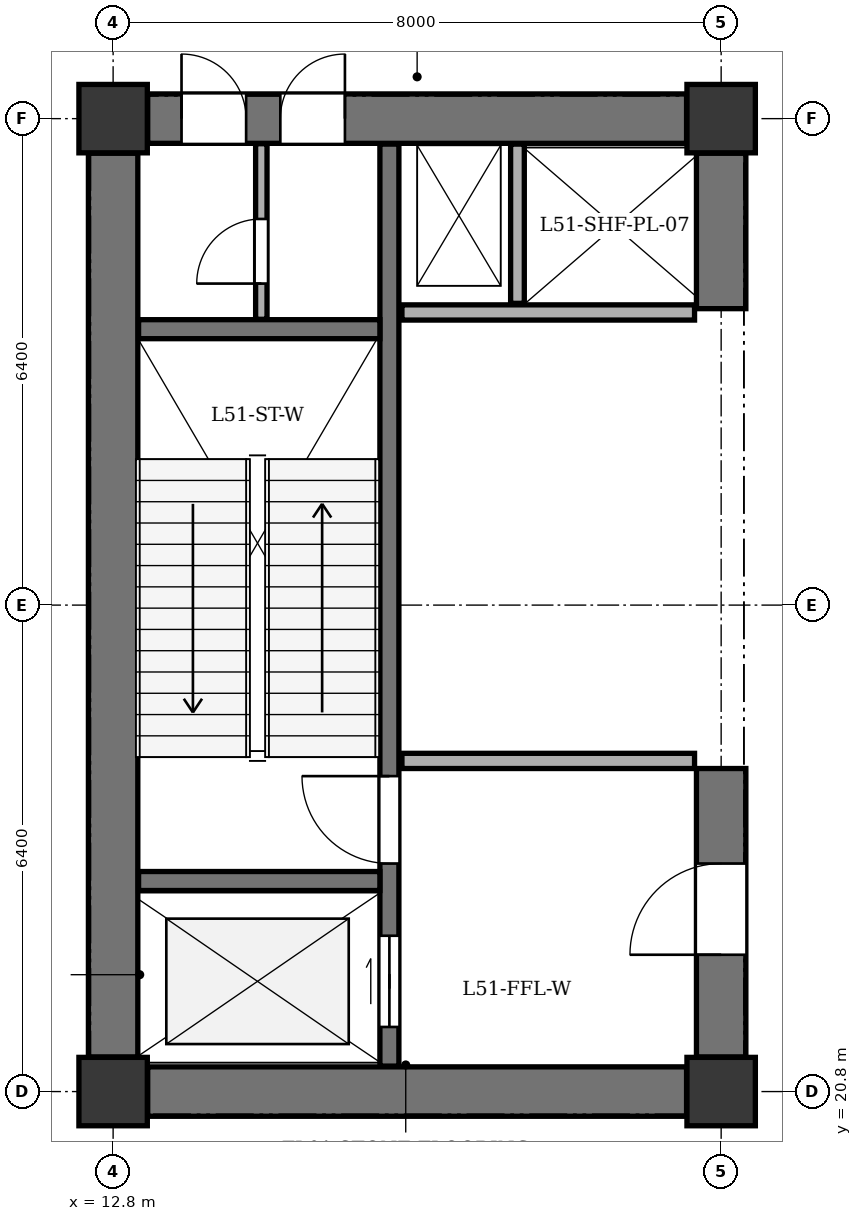
"""IFC4 building model, lengths in metres.
Left out: names, types, materials, properties, quantities, classifications, styles, units other than length and angle.
Written with IfcOpenShell. Run it as: python <this file> out.ifc"""

import sys

from ifc_helpers import new_model, si_unit, direction, frame, frame_2d, origin, origin_2d, place, context, subcontext, project, spatial, rectangle, extrude, element, fill, save


model = new_model("IFC4")
c1 = context("Model", 3, precision=1e-05, world=origin(), true_north=direction((0.0, 1.0)))
c2 = subcontext(c1, "Body", "Model", "MODEL_VIEW")
j1 = project(units=[si_unit("LENGTHUNIT", "METRE"), si_unit("PLANEANGLEUNIT", "RADIAN")], contexts=[c1])
p1 = place(None, origin())
s1 = spatial("IfcSite", under=j1, at=p1, CompositionType="ELEMENT")
p2 = place(p1, origin())
s2 = spatial("IfcBuilding", under=s1, at=p2, CompositionType="ELEMENT")
p3 = place(p2, frame((0.0, 0.0, 197.3)))
s3 = spatial("IfcBuildingStorey", under=s2, at=p3, CompositionType="ELEMENT", Elevation=197.3)
for number, where, z_axis, x_axis in (
    (1, (12.8, 20.8, 0.0), (0.0, 0.0, 1.0), (1.0, 0.0, 0.0)),
    (2, (20.8, 20.8, 0.0), (0.0, 0.0, 1.0), (1.0, 0.0, 0.0)),
    (3, (12.8, 33.6, 0.0), (0.0, 0.0, 1.0), (1.0, 0.0, 0.0)),
    (4, (20.8, 33.6, 0.0), (0.0, 0.0, 1.0), (1.0, 0.0, 0.0)),
):
    element("IfcColumn", number, at=place(p3, frame(where, z_axis=z_axis, x_axis=x_axis)), inside=s3, PredefinedType="COLUMN", context=c2, shape_type="SweptSolid", body=[
        extrude(rectangle(XDim=0.9, YDim=0.9, at=origin_2d()), origin(), (0.0, 0.0, 1.0), 5.4),
    ])
p4 = place(p3, frame((12.8, 21.255, 0.0), z_axis=(0.0, 0.0, 1.0), x_axis=(0.0, 1.0, 0.0)))
e5 = element("IfcWall", 5, at=p4, inside=s3, PredefinedType="SHEAR", context=c2, shape_type="SweptSolid", body=[
    extrude(rectangle(XDim=11.89, YDim=0.65, at=frame_2d((5.945, 0.0))), origin(), (0.0, 0.0, 1.0), 5.04),
])
p5 = place(p3, frame((13.255, 20.8, 0.0), z_axis=(0.0, 0.0, 1.0), x_axis=(1.0, 0.0, 0.0)))
e6 = element("IfcWall", 6, at=p5, inside=s3, PredefinedType="SHEAR", context=c2, shape_type="SweptSolid", body=[
    extrude(rectangle(XDim=7.09, YDim=0.65, at=frame_2d((3.545, 0.0))), origin(), (0.0, 0.0, 1.0), 5.04),
])
p6 = place(p3, frame((13.255, 33.6, 0.0), z_axis=(0.0, 0.0, 1.0), x_axis=(1.0, 0.0, 0.0)))
e7 = element("IfcWall", 7, at=p6, inside=s3, PredefinedType="SHEAR", context=c2, shape_type="SweptSolid", body=[
    extrude(rectangle(XDim=7.09, YDim=0.65, at=frame_2d((3.545, 0.0))), origin(), (0.0, 0.0, 1.0), 5.04),
])
p7 = place(p6, frame((0.445, 0.0, 0.0)))
e8 = element("IfcOpeningElement", 8, at=p7, cuts=e7, PredefinedType="OPENING", context=c2, shape_type="SweptSolid", body=[
    extrude(rectangle(XDim=0.85, YDim=2.02, at=frame_2d((0.425, 1.01))), frame((0.0, 0.335, 0.0), z_axis=(0.0, -1.0, 0.0), x_axis=(1.0, 0.0, 0.0)), (0.0, 0.0, 1.0), 0.67),
])
p8 = place(p6, frame((1.745, 0.0, 0.0)))
e9 = element("IfcOpeningElement", 9, at=p8, cuts=e7, PredefinedType="OPENING", context=c2, shape_type="SweptSolid", body=[
    extrude(rectangle(XDim=0.85, YDim=2.02, at=frame_2d((0.425, 1.01))), frame((0.0, 0.335, 0.0), z_axis=(0.0, -1.0, 0.0), x_axis=(1.0, 0.0, 0.0)), (0.0, 0.0, 1.0), 0.67),
])
p9 = place(p3, frame((20.8, 21.255, 0.0), z_axis=(0.0, 0.0, 1.0), x_axis=(0.0, 1.0, 0.0)))
e10 = element("IfcWall", 10, at=p9, inside=s3, PredefinedType="SHEAR", context=c2, shape_type="SweptSolid", body=[
    extrude(rectangle(XDim=3.795, YDim=0.65, at=frame_2d((1.897, 0.0))), origin(), (0.0, 0.0, 1.0), 5.04),
])
p10 = place(p9, frame((1.345, 0.0, 0.0)))
e11 = element("IfcOpeningElement", 11, at=p10, cuts=e10, PredefinedType="OPENING", context=c2, shape_type="SweptSolid", body=[
    extrude(rectangle(XDim=1.2, YDim=2.15, at=frame_2d((0.6, 1.075))), frame((0.0, 0.335, 0.0), z_axis=(0.0, -1.0, 0.0), x_axis=(1.0, 0.0, 0.0)), (0.0, 0.0, 1.0), 0.67),
])
p11 = place(p3, frame((20.8, 31.1, 0.0), z_axis=(0.0, 0.0, 1.0), x_axis=(0.0, 1.0, 0.0)))
e12 = element("IfcWall", 12, at=p11, inside=s3, PredefinedType="SHEAR", context=c2, shape_type="SweptSolid", body=[
    extrude(rectangle(XDim=2.045, YDim=0.65, at=frame_2d((1.022, 0.0))), origin(), (0.0, 0.0, 1.0), 5.04),
])
p12 = place(p3, frame((16.435, 21.135, 0.0), z_axis=(0.0, 0.0, 1.0), x_axis=(0.0, 1.0, 0.0)))
e13 = element("IfcWall", 13, at=p12, inside=s3, PredefinedType="SHEAR", context=c2, shape_type="SweptSolid", body=[
    extrude(rectangle(XDim=12.13, YDim=0.25, at=frame_2d((6.065, 0.0))), origin(), (0.0, 0.0, 1.0), 5.04),
])
p13 = place(p12, frame((0.515, 0.0, 0.0)))
e14 = element("IfcOpeningElement", 14, at=p13, cuts=e13, PredefinedType="OPENING", context=c2, shape_type="SweptSolid", body=[
    extrude(rectangle(XDim=1.2, YDim=2.15, at=frame_2d((0.6, 1.075))), frame((0.0, 0.135, 0.0), z_axis=(0.0, -1.0, 0.0), x_axis=(1.0, 0.0, 0.0)), (0.0, 0.0, 1.0), 0.27),
])
p14 = place(p12, frame((2.665, 0.0, 0.0)))
e15 = element("IfcOpeningElement", 15, at=p14, cuts=e13, PredefinedType="OPENING", context=c2, shape_type="SweptSolid", body=[
    extrude(rectangle(XDim=1.15, YDim=2.15, at=frame_2d((0.575, 1.075))), frame((0.0, 0.135, 0.0), z_axis=(0.0, -1.0, 0.0), x_axis=(1.0, 0.0, 0.0)), (0.0, 0.0, 1.0), 0.27),
])
for number, where, z_axis, x_axis in (
    (16, (13.135, 23.57, 0.0), (0.0, 0.0, 1.0), (1.0, 0.0, 0.0)),
    (17, (13.135, 30.83, 0.0), (0.0, 0.0, 1.0), (1.0, 0.0, 0.0)),
):
    element("IfcWall", number, at=place(p3, frame(where, z_axis=z_axis, x_axis=x_axis)), inside=s3, PredefinedType="SHEAR", context=c2, shape_type="SweptSolid", body=[
        extrude(rectangle(XDim=3.175, YDim=0.25, at=frame_2d((1.587, 0.0))), origin(), (0.0, 0.0, 1.0), 5.04),
    ])
for number, where, z_axis, x_axis in (
    (18, (16.6, 25.15, 0.0), (0.0, 0.0, 1.0), (1.0, 0.0, 0.0)),
    (19, (16.6, 31.05, 0.0), (0.0, 0.0, 1.0), (1.0, 0.0, 0.0)),
):
    element("IfcWall", number, at=place(p3, frame(where, z_axis=z_axis, x_axis=x_axis)), inside=s3, PredefinedType="SOLIDWALL", context=c2, shape_type="SweptSolid", body=[
        extrude(rectangle(XDim=3.85, YDim=0.2, at=frame_2d((1.925, 0.0))), origin(), (0.0, 0.0, 1.0), 5.04),
    ])
p15 = place(p3, frame((18.12, 31.17, 0.0), z_axis=(0.0, 0.0, 1.0), x_axis=(0.0, 1.0, 0.0)))
e20 = element("IfcWall", 20, at=p15, inside=s3, PredefinedType="PARTITIONING", context=c2, shape_type="SweptSolid", body=[
    extrude(rectangle(XDim=2.095, YDim=0.18, at=frame_2d((1.047, 0.0))), origin(), (0.0, 0.0, 1.0), 5.04),
])
p16 = place(p3, frame((14.75, 30.96, 0.0), z_axis=(0.0, 0.0, 1.0), x_axis=(0.0, 1.0, 0.0)))
e21 = element("IfcWall", 21, at=p16, inside=s3, PredefinedType="PARTITIONING", context=c2, shape_type="SweptSolid", body=[
    extrude(rectangle(XDim=2.31, YDim=0.15, at=frame_2d((1.155, 0.0))), origin(), (0.0, 0.0, 1.0), 5.04),
])
p17 = place(p16, frame((0.47, 0.0, 0.0)))
e22 = element("IfcOpeningElement", 22, at=p17, cuts=e21, PredefinedType="OPENING", context=c2, shape_type="SweptSolid", body=[
    extrude(rectangle(XDim=0.85, YDim=2.02, at=frame_2d((0.425, 1.01))), frame((0.0, 0.085, 0.0), z_axis=(0.0, -1.0, 0.0), x_axis=(1.0, 0.0, 0.0)), (0.0, 0.0, 1.0), 0.17),
])
p18 = place(p7, origin())
e23 = element("IfcDoor", 23, at=p18, inside=s3, OperationType="SINGLE_SWING_LEFT", PredefinedType="DOOR", context=c2, shape_type="SweptSolid", body=[
    extrude(rectangle(XDim=0.85, YDim=2.02, at=frame_2d((0.425, 1.01))), frame((0.0, 0.025, 0.0), z_axis=(0.0, -1.0, 0.0), x_axis=(1.0, 0.0, 0.0)), (0.0, 0.0, 1.0), 0.05),
])
fill(e8, e23)
p19 = place(p8, origin())
e24 = element("IfcDoor", 24, at=p19, inside=s3, OperationType="SINGLE_SWING_RIGHT", PredefinedType="DOOR", context=c2, shape_type="SweptSolid", body=[
    extrude(rectangle(XDim=0.85, YDim=2.02, at=frame_2d((0.425, 1.01))), frame((0.0, 0.025, 0.0), z_axis=(0.0, -1.0, 0.0), x_axis=(1.0, 0.0, 0.0)), (0.0, 0.0, 1.0), 0.05),
])
fill(e9, e24)
p20 = place(p10, origin())
e25 = element("IfcDoor", 25, at=p20, inside=s3, OperationType="SINGLE_SWING_LEFT", PredefinedType="DOOR", context=c2, shape_type="SweptSolid", body=[
    extrude(rectangle(XDim=1.2, YDim=2.15, at=frame_2d((0.6, 1.075))), frame((0.0, 0.025, 0.0), z_axis=(0.0, -1.0, 0.0), x_axis=(1.0, 0.0, 0.0)), (0.0, 0.0, 1.0), 0.05),
])
fill(e11, e25)
p21 = place(p13, origin())
e26 = element("IfcDoor", 26, at=p21, inside=s3, OperationType="DOUBLE_DOOR_SLIDING", PredefinedType="DOOR", context=c2, shape_type="SweptSolid", body=[
    extrude(rectangle(XDim=1.2, YDim=2.15, at=frame_2d((0.6, 1.075))), frame((0.0, 0.025, 0.0), z_axis=(0.0, -1.0, 0.0), x_axis=(1.0, 0.0, 0.0)), (0.0, 0.0, 1.0), 0.05),
])
fill(e14, e26)
p22 = place(p14, origin())
e27 = element("IfcDoor", 27, at=p22, inside=s3, OperationType="SINGLE_SWING_RIGHT", PredefinedType="DOOR", context=c2, shape_type="SweptSolid", body=[
    extrude(rectangle(XDim=1.15, YDim=2.15, at=frame_2d((0.575, 1.075))), frame((0.0, 0.025, 0.0), z_axis=(0.0, -1.0, 0.0), x_axis=(1.0, 0.0, 0.0)), (0.0, 0.0, 1.0), 0.05),
])
fill(e15, e27)
p23 = place(p17, origin())
e28 = element("IfcDoor", 28, at=p23, inside=s3, OperationType="SINGLE_SWING_LEFT", PredefinedType="DOOR", context=c2, shape_type="SweptSolid", body=[
    extrude(rectangle(XDim=0.85, YDim=2.02, at=frame_2d((0.425, 1.01))), frame((0.0, 0.025, 0.0), z_axis=(0.0, -1.0, 0.0), x_axis=(1.0, 0.0, 0.0)), (0.0, 0.0, 1.0), 0.05),
])
fill(e22, e28)
save(model, sys.argv[1])
